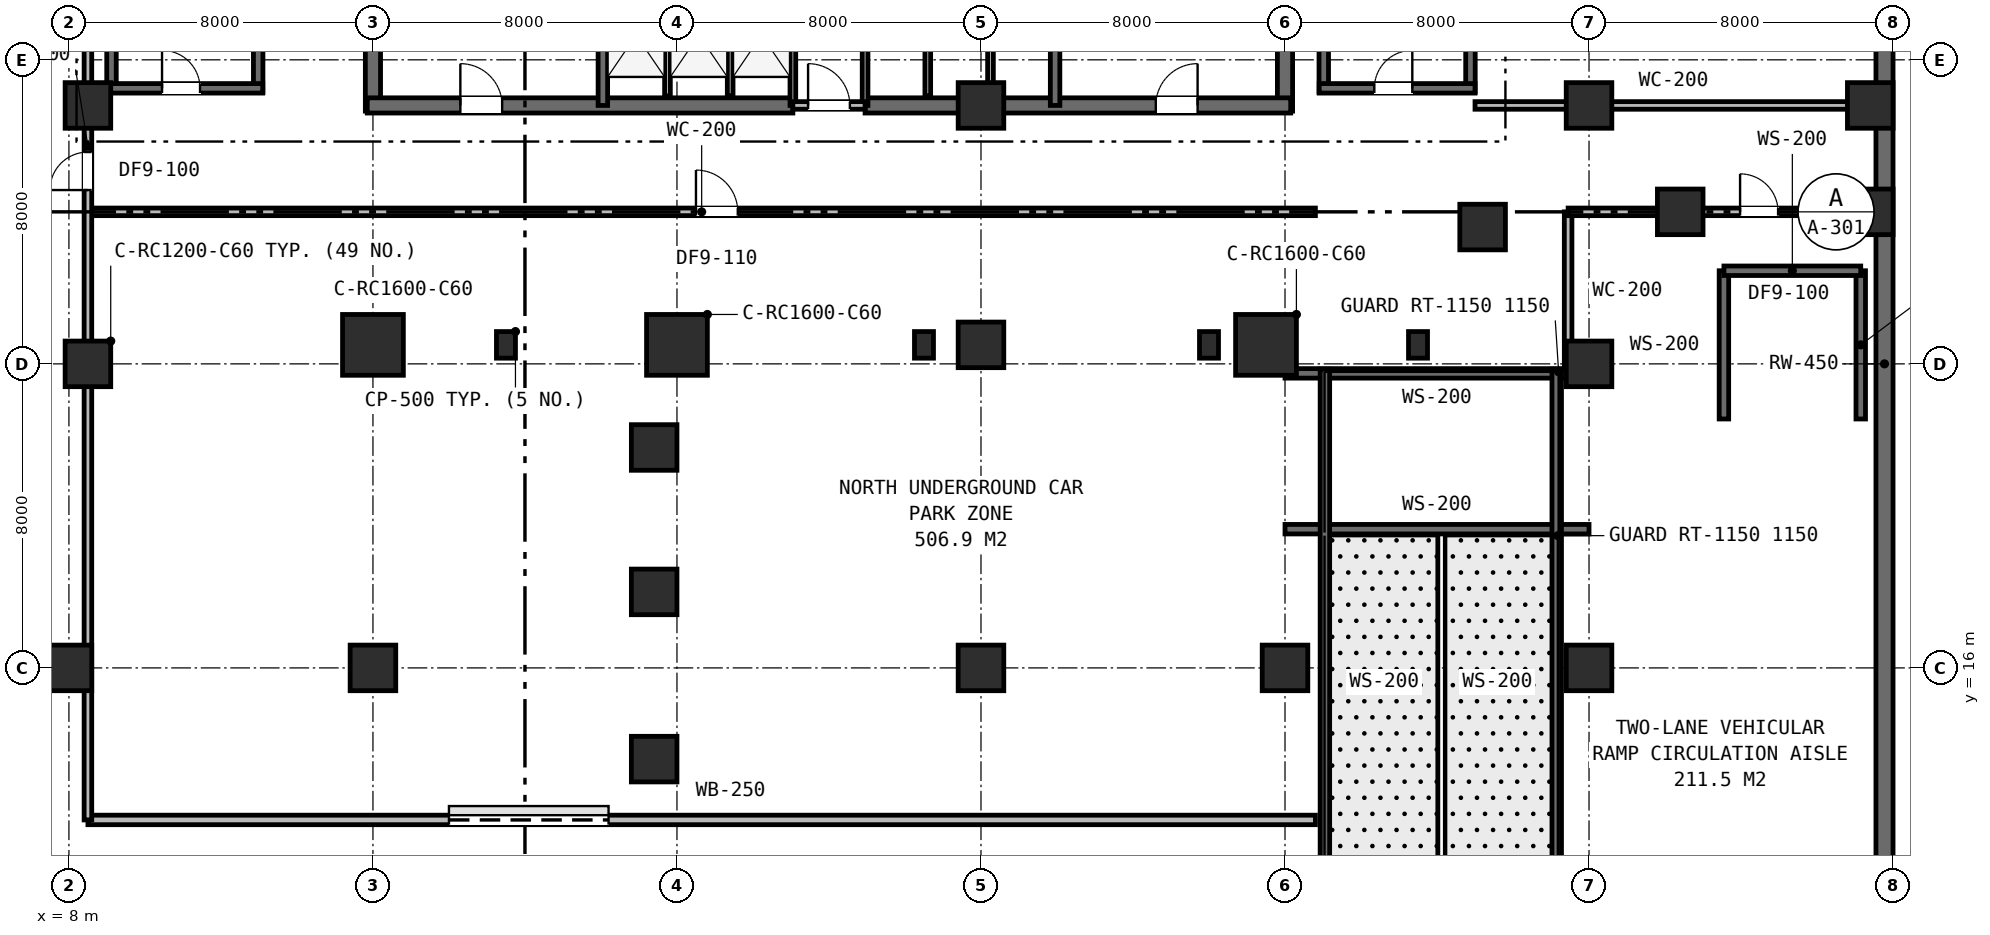
"""IFC4 building model, lengths in metres.
Left out: names, types, materials, properties, quantities, classifications, styles, units other than length and angle.
Written with IfcOpenShell. Run it as: python <this file> out.ifc"""

import sys

from ifc_helpers import new_model, si_unit, direction, frame, frame_2d, origin, origin_2d, place, context, subcontext, project, spatial, rectangle, extrude, element, fill, save


model = new_model("IFC4")
c1 = context("Model", 3, precision=1e-05, world=origin(), true_north=direction((0.0, 1.0)))
c2 = subcontext(c1, "Body", "Model", "MODEL_VIEW")
j1 = project(units=[si_unit("LENGTHUNIT", "METRE"), si_unit("PLANEANGLEUNIT", "RADIAN")], contexts=[c1])
p1 = place(None, origin())
s1 = spatial("IfcSite", under=j1, at=p1, CompositionType="ELEMENT")
p2 = place(p1, origin())
s2 = spatial("IfcBuilding", under=s1, at=p2, CompositionType="ELEMENT")
p3 = place(p2, frame((0.0, 0.0, -13.2)))
s3 = spatial("IfcBuildingStorey", under=s2, at=p3, CompositionType="ELEMENT", Elevation=-13.2)
p4 = place(p3, frame((55.775, 0.0, 0.0), z_axis=(0.0, 0.0, 1.0), x_axis=(0.0, 1.0, 0.0)))
e1 = element("IfcWall", 1, at=p4, inside=s3, PredefinedType="USERDEFINED", context=c2, shape_type="SweptSolid", body=[
    extrude(rectangle(XDim=48.0, YDim=0.45, at=frame_2d((24.0, 0.0))), origin(), (0.0, 0.0, 1.0), 3.8),
])
for number, where, z_axis, x_axis in (
    (2, (16.0, 30.65, 0.0), (0.0, 0.0, 1.0), (0.0, 1.0, 0.0)),
    (3, (40.0, 30.65, 0.0), (0.0, 0.0, 1.0), (0.0, 1.0, 0.0)),
):
    element("IfcWall", number, at=place(p3, frame(where, z_axis=z_axis, x_axis=x_axis)), inside=s3, PredefinedType="SHEAR", context=c2, shape_type="SweptSolid", body=[
        extrude(rectangle(XDim=12.3, YDim=0.4, at=frame_2d((6.15, 0.0))), origin(), (0.0, 0.0, 1.0), 3.8),
    ])
p5 = place(p3, frame((15.85, 30.8, 0.0), z_axis=(0.0, 0.0, 1.0), x_axis=(1.0, 0.0, 0.0)))
e4 = element("IfcWall", 4, at=p5, inside=s3, PredefinedType="SHEAR", context=c2, shape_type="SweptSolid", body=[
    extrude(rectangle(XDim=11.2, YDim=0.4, at=frame_2d((5.6, 0.0))), origin(), (0.0, 0.0, 1.0), 3.8),
])
p6 = place(p5, frame((2.45, 0.0, 0.0)))
e5 = element("IfcOpeningElement", 5, at=p6, cuts=e4, PredefinedType="OPENING", context=c2, shape_type="SweptSolid", body=[
    extrude(rectangle(XDim=1.1, YDim=2.15, at=frame_2d((0.55, 1.075))), frame((0.0, 0.21, 0.0), z_axis=(0.0, -1.0, 0.0), x_axis=(1.0, 0.0, 0.0)), (0.0, 0.0, 1.0), 0.42),
])
p7 = place(p3, frame((28.95, 30.8, 0.0), z_axis=(0.0, 0.0, 1.0), x_axis=(1.0, 0.0, 0.0)))
e6 = element("IfcWall", 6, at=p7, inside=s3, PredefinedType="SHEAR", context=c2, shape_type="SweptSolid", body=[
    extrude(rectangle(XDim=11.2, YDim=0.4, at=frame_2d((5.6, 0.0))), origin(), (0.0, 0.0, 1.0), 3.8),
])
p8 = place(p7, frame((7.65, 0.0, 0.0)))
e7 = element("IfcOpeningElement", 7, at=p8, cuts=e6, PredefinedType="OPENING", context=c2, shape_type="SweptSolid", body=[
    extrude(rectangle(XDim=1.1, YDim=2.15, at=frame_2d((0.55, 1.075))), frame((0.0, 0.21, 0.0), z_axis=(0.0, -1.0, 0.0), x_axis=(1.0, 0.0, 0.0)), (0.0, 0.0, 1.0), 0.42),
])
for number, where, z_axis, x_axis in (
    (8, (22.05, 30.8, 0.0), (0.0, 0.0, 1.0), (0.0, 1.0, 0.0)),
    (9, (33.95, 30.8, 0.0), (0.0, 0.0, 1.0), (0.0, 1.0, 0.0)),
):
    element("IfcWall", number, at=place(p3, frame(where, z_axis=z_axis, x_axis=x_axis)), inside=s3, PredefinedType="SHEAR", context=c2, shape_type="SweptSolid", body=[
        extrude(rectangle(XDim=6.45, YDim=0.25, at=frame_2d((3.225, 0.0))), origin(), (0.0, 0.0, 1.0), 3.8),
    ])
for number, where, z_axis, x_axis in (
    (10, (9.12, 31.15, 0.0), (0.0, 0.0, 1.0), (0.0, 1.0, 0.0)),
    (11, (12.98, 31.15, 0.0), (0.0, 0.0, 1.0), (0.0, 1.0, 0.0)),
):
    element("IfcWall", number, at=place(p3, frame(where, z_axis=z_axis, x_axis=x_axis)), inside=s3, PredefinedType="SHEAR", context=c2, shape_type="SweptSolid", body=[
        extrude(rectangle(XDim=8.8, YDim=0.25, at=frame_2d((4.4, 0.0))), origin(), (0.0, 0.0, 1.0), 3.8),
    ])
p9 = place(p3, frame((9.0, 31.25, 0.0), z_axis=(0.0, 0.0, 1.0), x_axis=(1.0, 0.0, 0.0)))
e12 = element("IfcWall", 12, at=p9, inside=s3, PredefinedType="SHEAR", context=c2, shape_type="SweptSolid", body=[
    extrude(rectangle(XDim=4.1, YDim=0.25, at=frame_2d((2.05, 0.0))), origin(), (0.0, 0.0, 1.0), 3.8),
])
p10 = place(p9, frame((1.45, 0.0, 0.0)))
e13 = element("IfcOpeningElement", 13, at=p10, cuts=e12, PredefinedType="OPENING", context=c2, shape_type="SweptSolid", body=[
    extrude(rectangle(XDim=1.0, YDim=2.15, at=frame_2d((0.5, 1.075))), frame((0.0, 0.135, 0.0), z_axis=(0.0, -1.0, 0.0), x_axis=(1.0, 0.0, 0.0)), (0.0, 0.0, 1.0), 0.27),
])
for number, where, z_axis, x_axis in (
    (14, (41.02, 31.15, 0.0), (0.0, 0.0, 1.0), (0.0, 1.0, 0.0)),
    (15, (44.88, 31.15, 0.0), (0.0, 0.0, 1.0), (0.0, 1.0, 0.0)),
):
    element("IfcWall", number, at=place(p3, frame(where, z_axis=z_axis, x_axis=x_axis)), inside=s3, PredefinedType="SHEAR", context=c2, shape_type="SweptSolid", body=[
        extrude(rectangle(XDim=8.8, YDim=0.25, at=frame_2d((4.4, 0.0))), origin(), (0.0, 0.0, 1.0), 3.8),
    ])
p11 = place(p3, frame((40.9, 31.25, 0.0), z_axis=(0.0, 0.0, 1.0), x_axis=(1.0, 0.0, 0.0)))
e16 = element("IfcWall", 16, at=p11, inside=s3, PredefinedType="SHEAR", context=c2, shape_type="SweptSolid", body=[
    extrude(rectangle(XDim=4.1, YDim=0.25, at=frame_2d((2.05, 0.0))), origin(), (0.0, 0.0, 1.0), 3.8),
])
p12 = place(p11, frame((1.45, 0.0, 0.0)))
e17 = element("IfcOpeningElement", 17, at=p12, cuts=e16, PredefinedType="OPENING", context=c2, shape_type="SweptSolid", body=[
    extrude(rectangle(XDim=1.0, YDim=2.15, at=frame_2d((0.5, 1.075))), frame((0.0, 0.135, 0.0), z_axis=(0.0, -1.0, 0.0), x_axis=(1.0, 0.0, 0.0)), (0.0, 0.0, 1.0), 0.27),
])
p13 = place(p3, frame((8.5, 24.0, 0.0), z_axis=(0.0, 0.0, 1.0), x_axis=(1.0, 0.0, 0.0)))
e18 = element("IfcColumn", 18, at=p13, inside=s3, PredefinedType="COLUMN", context=c2, shape_type="SweptSolid", body=[
    extrude(rectangle(XDim=1.2, YDim=1.2, at=origin_2d()), origin(), (0.0, 0.0, 1.0), 3.8),
])
for number, where, z_axis, x_axis in (
    (19, (16.0, 24.5, 0.0), (0.0, 0.0, 1.0), (1.0, 0.0, 0.0)),
    (20, (24.0, 24.5, 0.0), (0.0, 0.0, 1.0), (1.0, 0.0, 0.0)),
):
    element("IfcColumn", number, at=place(p3, frame(where, z_axis=z_axis, x_axis=x_axis)), inside=s3, PredefinedType="COLUMN", context=c2, shape_type="SweptSolid", body=[
        extrude(rectangle(XDim=1.6, YDim=1.6, at=origin_2d()), origin(), (0.0, 0.0, 1.0), 3.8),
    ])
p14 = place(p3, frame((32.0, 24.5, 0.0), z_axis=(0.0, 0.0, 1.0), x_axis=(1.0, 0.0, 0.0)))
e21 = element("IfcColumn", 21, at=p14, inside=s3, PredefinedType="COLUMN", context=c2, shape_type="SweptSolid", body=[
    extrude(rectangle(XDim=1.2, YDim=1.2, at=origin_2d()), origin(), (0.0, 0.0, 1.0), 3.8),
])
p15 = place(p3, frame((39.5, 24.5, 0.0), z_axis=(0.0, 0.0, 1.0), x_axis=(1.0, 0.0, 0.0)))
e22 = element("IfcColumn", 22, at=p15, inside=s3, PredefinedType="COLUMN", context=c2, shape_type="SweptSolid", body=[
    extrude(rectangle(XDim=1.6, YDim=1.6, at=origin_2d()), origin(), (0.0, 0.0, 1.0), 3.8),
])
for number, where, z_axis, x_axis in (
    (23, (8.5, 30.8, 0.0), (0.0, 0.0, 1.0), (1.0, 0.0, 0.0)),
    (24, (45.2, 27.6, 0.0), (0.0, 0.0, 1.0), (1.0, 0.0, 0.0)),
    (25, (50.4, 28.0, 0.0), (0.0, 0.0, 1.0), (1.0, 0.0, 0.0)),
    (26, (55.4, 28.0, 0.0), (0.0, 0.0, 1.0), (1.0, 0.0, 0.0)),
    (27, (55.4, 30.8, 0.0), (0.0, 0.0, 1.0), (1.0, 0.0, 0.0)),
    (28, (23.4, 13.6, 0.0), (0.0, 0.0, 1.0), (1.0, 0.0, 0.0)),
    (29, (23.4, 18.0, 0.0), (0.0, 0.0, 1.0), (1.0, 0.0, 0.0)),
    (30, (23.4, 21.8, 0.0), (0.0, 0.0, 1.0), (1.0, 0.0, 0.0)),
    (31, (32.0, 30.8, 0.0), (0.0, 0.0, 1.0), (1.0, 0.0, 0.0)),
    (32, (8.0, 16.0, 0.0), (0.0, 0.0, 1.0), (1.0, 0.0, 0.0)),
    (33, (16.0, 16.0, 0.0), (0.0, 0.0, 1.0), (1.0, 0.0, 0.0)),
    (34, (32.0, 16.0, 0.0), (0.0, 0.0, 1.0), (1.0, 0.0, 0.0)),
    (35, (40.0, 16.0, 0.0), (0.0, 0.0, 1.0), (1.0, 0.0, 0.0)),
    (36, (48.0, 16.0, 0.0), (0.0, 0.0, 1.0), (1.0, 0.0, 0.0)),
    (37, (48.0, 24.0, 0.0), (0.0, 0.0, 1.0), (1.0, 0.0, 0.0)),
    (38, (48.0, 30.8, 0.0), (0.0, 0.0, 1.0), (1.0, 0.0, 0.0)),
):
    element("IfcColumn", number, at=place(p3, frame(where, z_axis=z_axis, x_axis=x_axis)), inside=s3, PredefinedType="COLUMN", context=c2, shape_type="SweptSolid", body=[
        extrude(rectangle(XDim=1.2, YDim=1.2, at=origin_2d()), origin(), (0.0, 0.0, 1.0), 3.8),
    ])
p16 = place(p3, frame((8.5, 12.0, 0.0), z_axis=(0.0, 0.0, 1.0), x_axis=(1.0, 0.0, 0.0)))
e39 = element("IfcWall", 39, at=p16, inside=s3, PredefinedType="STANDARD", context=c2, shape_type="SweptSolid", body=[
    extrude(rectangle(XDim=32.3, YDim=0.25, at=frame_2d((16.15, 0.0))), origin(), (0.0, 0.0, 1.0), 3.15),
])
p17 = place(p16, frame((9.5, 0.0, 0.0)))
e40 = element("IfcOpeningElement", 40, at=p17, cuts=e39, PredefinedType="OPENING", context=c2, shape_type="SweptSolid", body=[
    extrude(rectangle(XDim=4.2, YDim=2.95, at=frame_2d((2.1, 1.475))), frame((0.0, 0.135, 0.0), z_axis=(0.0, -1.0, 0.0), x_axis=(1.0, 0.0, 0.0)), (0.0, 0.0, 1.0), 0.27),
])
for number, where, z_axis, x_axis in (
    (41, (27.05, 30.8, 0.0), (0.0, 0.0, 1.0), (0.0, 1.0, 0.0)),
    (42, (28.95, 30.8, 0.0), (0.0, 0.0, 1.0), (0.0, 1.0, 0.0)),
):
    element("IfcWall", number, at=place(p3, frame(where, z_axis=z_axis, x_axis=x_axis)), inside=s3, PredefinedType="PLUMBINGWALL", context=c2, shape_type="SweptSolid", body=[
        extrude(rectangle(XDim=3.45, YDim=0.15, at=frame_2d((1.725, 0.0))), origin(), (0.0, 0.0, 1.0), 3.49),
    ])
p18 = place(p3, frame((27.05, 30.8, 0.0), z_axis=(0.0, 0.0, 1.0), x_axis=(1.0, 0.0, 0.0)))
e43 = element("IfcWall", 43, at=p18, inside=s3, PredefinedType="PARTITIONING", context=c2, shape_type="SweptSolid", body=[
    extrude(rectangle(XDim=1.9, YDim=0.2, at=frame_2d((0.95, 0.0))), origin(), (0.0, 0.0, 1.0), 3.49),
])
p19 = place(p18, frame((0.4, 0.0, 0.0)))
e44 = element("IfcOpeningElement", 44, at=p19, cuts=e43, PredefinedType="OPENING", context=c2, shape_type="SweptSolid", body=[
    extrude(rectangle(XDim=1.1, YDim=2.15, at=frame_2d((0.55, 1.075))), frame((0.0, 0.11, 0.0), z_axis=(0.0, -1.0, 0.0), x_axis=(1.0, 0.0, 0.0)), (0.0, 0.0, 1.0), 0.22),
])
for number, where, z_axis, x_axis in (
    (45, (23.75, 31.05, 0.0), (0.0, 0.0, 1.0), (0.0, 1.0, 0.0)),
    (46, (25.4, 31.05, 0.0), (0.0, 0.0, 1.0), (0.0, 1.0, 0.0)),
    (47, (30.6, 31.05, 0.0), (0.0, 0.0, 1.0), (0.0, 1.0, 0.0)),
):
    element("IfcWall", number, at=place(p3, frame(where, z_axis=z_axis, x_axis=x_axis)), inside=s3, PredefinedType="PLUMBINGWALL", context=c2, shape_type="SweptSolid", body=[
        extrude(rectangle(XDim=3.1, YDim=0.15, at=frame_2d((1.55, 0.0))), origin(), (0.0, 0.0, 1.0), 3.49),
    ])
p20 = place(p3, frame((32.25, 31.05, 0.0), z_axis=(0.0, 0.0, 1.0), x_axis=(0.0, 1.0, 0.0)))
e48 = element("IfcWall", 48, at=p20, inside=s3, PredefinedType="PLUMBINGWALL", context=c2, shape_type="SweptSolid", body=[
    extrude(rectangle(XDim=3.1, YDim=0.15, at=frame_2d((1.55, 0.0))), origin(), (0.0, 0.0, 1.0), 2.88),
])
p21 = place(p3, frame((45.0, 30.8, 0.0), z_axis=(0.0, 0.0, 1.0), x_axis=(1.0, 0.0, 0.0)))
e49 = element("IfcWall", 49, at=p21, inside=s3, PredefinedType="PARTITIONING", context=c2, shape_type="SweptSolid", body=[
    extrude(rectangle(XDim=10.45, YDim=0.2, at=frame_2d((5.225, 0.0))), origin(), (0.0, 0.0, 1.0), 2.88),
])
p22 = place(p3, frame((8.5, 28.0, 0.0), z_axis=(0.0, 0.0, 1.0), x_axis=(1.0, 0.0, 0.0)))
e50 = element("IfcWall", 50, at=p22, inside=s3, PredefinedType="PARTITIONING", context=c2, shape_type="SweptSolid", body=[
    extrude(rectangle(XDim=32.3, YDim=0.2, at=frame_2d((16.15, 0.0))), origin(), (0.0, 0.0, 1.0), 2.88),
])
p23 = place(p22, frame((16.0, 0.0, 0.0)))
e51 = element("IfcOpeningElement", 51, at=p23, cuts=e50, PredefinedType="OPENING", context=c2, shape_type="SweptSolid", body=[
    extrude(rectangle(XDim=1.1, YDim=2.15, at=frame_2d((0.55, 1.075))), frame((0.0, 0.11, 0.0), z_axis=(0.0, -1.0, 0.0), x_axis=(1.0, 0.0, 0.0)), (0.0, 0.0, 1.0), 0.22),
])
p24 = place(p3, frame((8.5, 12.0, 0.0), z_axis=(0.0, 0.0, 1.0), x_axis=(0.0, 1.0, 0.0)))
e52 = element("IfcWall", 52, at=p24, inside=s3, PredefinedType="PARTITIONING", context=c2, shape_type="SweptSolid", body=[
    extrude(rectangle(XDim=35.45, YDim=0.2, at=frame_2d((17.725, 0.0))), origin(), (0.0, 0.0, 1.0), 2.63),
])
p25 = place(p24, frame((16.574, 0.0, 0.0)))
e53 = element("IfcOpeningElement", 53, at=p25, cuts=e52, PredefinedType="OPENING", context=c2, shape_type="SweptSolid", body=[
    extrude(rectangle(XDim=1.0, YDim=2.15, at=frame_2d((0.5, 1.075))), frame((0.0, 0.11, 0.0), z_axis=(0.0, -1.0, 0.0), x_axis=(1.0, 0.0, 0.0)), (0.0, 0.0, 1.0), 0.22),
])
p26 = place(p3, frame((47.45, 23.85, 0.0), z_axis=(0.0, 0.0, 1.0), x_axis=(0.0, 1.0, 0.0)))
e54 = element("IfcWall", 54, at=p26, inside=s3, PredefinedType="PARTITIONING", context=c2, shape_type="SweptSolid", body=[
    extrude(rectangle(XDim=4.15, YDim=0.2, at=frame_2d((2.075, 0.0))), origin(), (0.0, 0.0, 1.0), 2.88),
])
p27 = place(p3, frame((47.45, 28.0, 0.0), z_axis=(0.0, 0.0, 1.0), x_axis=(1.0, 0.0, 0.0)))
e55 = element("IfcWall", 55, at=p27, inside=s3, PredefinedType="PARTITIONING", context=c2, shape_type="SweptSolid", body=[
    extrude(rectangle(XDim=8.0, YDim=0.2, at=frame_2d((4.0, 0.0))), origin(), (0.0, 0.0, 1.0), 2.88),
])
p28 = place(p27, frame((4.525, 0.0, 0.0)))
e56 = element("IfcOpeningElement", 56, at=p28, cuts=e55, PredefinedType="OPENING", context=c2, shape_type="SweptSolid", body=[
    extrude(rectangle(XDim=1.0, YDim=2.15, at=frame_2d((0.5, 1.075))), frame((0.0, 0.11, 0.0), z_axis=(0.0, -1.0, 0.0), x_axis=(1.0, 0.0, 0.0)), (0.0, 0.0, 1.0), 0.22),
])
p29 = place(p3, frame((40.0, 23.75, 0.0), z_axis=(0.0, 0.0, 1.0), x_axis=(1.0, 0.0, 0.0)))
e57 = element("IfcWall", 57, at=p29, inside=s3, PredefinedType="STANDARD", context=c2, shape_type="SweptSolid", body=[
    extrude(rectangle(XDim=8.0, YDim=0.25, at=frame_2d((4.0, 0.0))), origin(), (0.0, 0.0, 1.0), 3.5),
])
p30 = place(p3, frame((40.0, 19.65, 0.0), z_axis=(0.0, 0.0, 1.0), x_axis=(1.0, 0.0, 0.0)))
e58 = element("IfcWall", 58, at=p30, inside=s3, PredefinedType="STANDARD", context=c2, shape_type="SweptSolid", body=[
    extrude(rectangle(XDim=8.0, YDim=0.25, at=frame_2d((4.0, 0.0))), origin(), (0.0, 0.0, 1.0), 1.57),
])
for number, where, z_axis, x_axis in (
    (59, (47.15, 7.38, 0.0), (0.0, 0.0, 1.0), (0.0, 1.0, 0.0)),
    (60, (41.05, 7.38, 0.0), (0.0, 0.0, 1.0), (0.0, 1.0, 0.0)),
):
    element("IfcWall", number, at=place(p3, frame(where, z_axis=z_axis, x_axis=x_axis)), inside=s3, PredefinedType="STANDARD", context=c2, shape_type="SweptSolid", body=[
        extrude(rectangle(XDim=16.48, YDim=0.25, at=frame_2d((8.24, 0.0))), origin(), (0.0, 0.0, 1.0), 3.5),
    ])
for number, where, z_axis, x_axis in (
    (61, (51.55, 22.55, 0.0), (0.0, 0.0, 1.0), (0.0, 1.0, 0.0)),
    (62, (55.15, 22.55, 0.0), (0.0, 0.0, 1.0), (0.0, 1.0, 0.0)),
):
    element("IfcWall", number, at=place(p3, frame(where, z_axis=z_axis, x_axis=x_axis)), inside=s3, PredefinedType="STANDARD", context=c2, shape_type="SweptSolid", body=[
        extrude(rectangle(XDim=3.9, YDim=0.25, at=frame_2d((1.95, 0.0))), origin(), (0.0, 0.0, 1.0), 3.8),
    ])
p31 = place(p3, frame((51.55, 26.45, 0.0), z_axis=(0.0, 0.0, 1.0), x_axis=(1.0, 0.0, 0.0)))
e63 = element("IfcWall", 63, at=p31, inside=s3, PredefinedType="STANDARD", context=c2, shape_type="SweptSolid", body=[
    extrude(rectangle(XDim=3.6, YDim=0.25, at=frame_2d((1.8, 0.0))), origin(), (0.0, 0.0, 1.0), 3.8),
])
for number, where, z_axis, x_axis in (
    (64, (19.5, 24.5, 0.0), (0.0, 0.0, 1.0), (1.0, 0.0, 0.0)),
    (65, (30.5, 24.5, 0.0), (0.0, 0.0, 1.0), (1.0, 0.0, 0.0)),
    (66, (38.0, 24.5, 0.0), (0.0, 0.0, 1.0), (1.0, 0.0, 0.0)),
    (67, (43.5, 24.5, 0.0), (0.0, 0.0, 1.0), (1.0, 0.0, 0.0)),
):
    element("IfcColumn", number, at=place(p3, frame(where, z_axis=z_axis, x_axis=x_axis)), inside=s3, PredefinedType="PILASTER", context=c2, shape_type="SweptSolid", body=[
        extrude(rectangle(XDim=0.5, YDim=0.7, at=origin_2d()), origin(), (0.0, 0.0, 1.0), 3.5),
    ])
p32 = place(p17, origin())
e68 = element("IfcDoor", 68, at=p32, inside=s3, OperationType="ROLLINGUP", PredefinedType="GATE", context=c2, shape_type="SweptSolid", body=[
    extrude(rectangle(XDim=4.2, YDim=2.95, at=frame_2d((2.1, 1.475))), frame((0.0, 0.025, 0.0), z_axis=(0.0, -1.0, 0.0), x_axis=(1.0, 0.0, 0.0)), (0.0, 0.0, 1.0), 0.05),
])
fill(e40, e68)
p33 = place(p19, origin())
e69 = element("IfcDoor", 69, at=p33, inside=s3, OperationType="SINGLE_SWING_LEFT", PredefinedType="DOOR", context=c2, shape_type="SweptSolid", body=[
    extrude(rectangle(XDim=1.1, YDim=2.15, at=frame_2d((0.55, 1.075))), frame((0.0, 0.025, 0.0), z_axis=(0.0, -1.0, 0.0), x_axis=(1.0, 0.0, 0.0)), (0.0, 0.0, 1.0), 0.05),
])
fill(e44, e69)
p34 = place(p6, origin())
e70 = element("IfcDoor", 70, at=p34, inside=s3, OperationType="SINGLE_SWING_LEFT", PredefinedType="DOOR", context=c2, shape_type="SweptSolid", body=[
    extrude(rectangle(XDim=1.1, YDim=2.15, at=frame_2d((0.55, 1.075))), frame((0.0, 0.025, 0.0), z_axis=(0.0, -1.0, 0.0), x_axis=(1.0, 0.0, 0.0)), (0.0, 0.0, 1.0), 0.05),
])
fill(e5, e70)
p35 = place(p8, origin())
e71 = element("IfcDoor", 71, at=p35, inside=s3, OperationType="SINGLE_SWING_RIGHT", PredefinedType="DOOR", context=c2, shape_type="SweptSolid", body=[
    extrude(rectangle(XDim=1.1, YDim=2.15, at=frame_2d((0.55, 1.075))), frame((0.0, 0.025, 0.0), z_axis=(0.0, -1.0, 0.0), x_axis=(1.0, 0.0, 0.0)), (0.0, 0.0, 1.0), 0.05),
])
fill(e7, e71)
p36 = place(p10, origin())
e72 = element("IfcDoor", 72, at=p36, inside=s3, OperationType="SINGLE_SWING_LEFT", PredefinedType="DOOR", context=c2, shape_type="SweptSolid", body=[
    extrude(rectangle(XDim=1.0, YDim=2.15, at=frame_2d((0.5, 1.075))), frame((0.0, 0.025, 0.0), z_axis=(0.0, -1.0, 0.0), x_axis=(1.0, 0.0, 0.0)), (0.0, 0.0, 1.0), 0.05),
])
fill(e13, e72)
p37 = place(p12, origin())
e73 = element("IfcDoor", 73, at=p37, inside=s3, OperationType="SINGLE_SWING_RIGHT", PredefinedType="DOOR", context=c2, shape_type="SweptSolid", body=[
    extrude(rectangle(XDim=1.0, YDim=2.15, at=frame_2d((0.5, 1.075))), frame((0.0, 0.025, 0.0), z_axis=(0.0, -1.0, 0.0), x_axis=(1.0, 0.0, 0.0)), (0.0, 0.0, 1.0), 0.05),
])
fill(e17, e73)
p38 = place(p23, origin())
e74 = element("IfcDoor", 74, at=p38, inside=s3, OperationType="SINGLE_SWING_LEFT", PredefinedType="DOOR", context=c2, shape_type="SweptSolid", body=[
    extrude(rectangle(XDim=1.1, YDim=2.15, at=frame_2d((0.55, 1.075))), frame((0.0, 0.025, 0.0), z_axis=(0.0, -1.0, 0.0), x_axis=(1.0, 0.0, 0.0)), (0.0, 0.0, 1.0), 0.05),
])
fill(e51, e74)
p39 = place(p25, origin())
e75 = element("IfcDoor", 75, at=p39, inside=s3, OperationType="SINGLE_SWING_LEFT", PredefinedType="DOOR", context=c2, shape_type="SweptSolid", body=[
    extrude(rectangle(XDim=1.0, YDim=2.15, at=frame_2d((0.5, 1.075))), frame((0.0, 0.025, 0.0), z_axis=(0.0, -1.0, 0.0), x_axis=(1.0, 0.0, 0.0)), (0.0, 0.0, 1.0), 0.05),
])
fill(e53, e75)
p40 = place(p28, origin())
e76 = element("IfcDoor", 76, at=p40, inside=s3, OperationType="SINGLE_SWING_LEFT", PredefinedType="DOOR", context=c2, shape_type="SweptSolid", body=[
    extrude(rectangle(XDim=1.0, YDim=2.15, at=frame_2d((0.5, 1.075))), frame((0.0, 0.025, 0.0), z_axis=(0.0, -1.0, 0.0), x_axis=(1.0, 0.0, 0.0)), (0.0, 0.0, 1.0), 0.05),
])
fill(e56, e76)
save(model, sys.argv[1])
